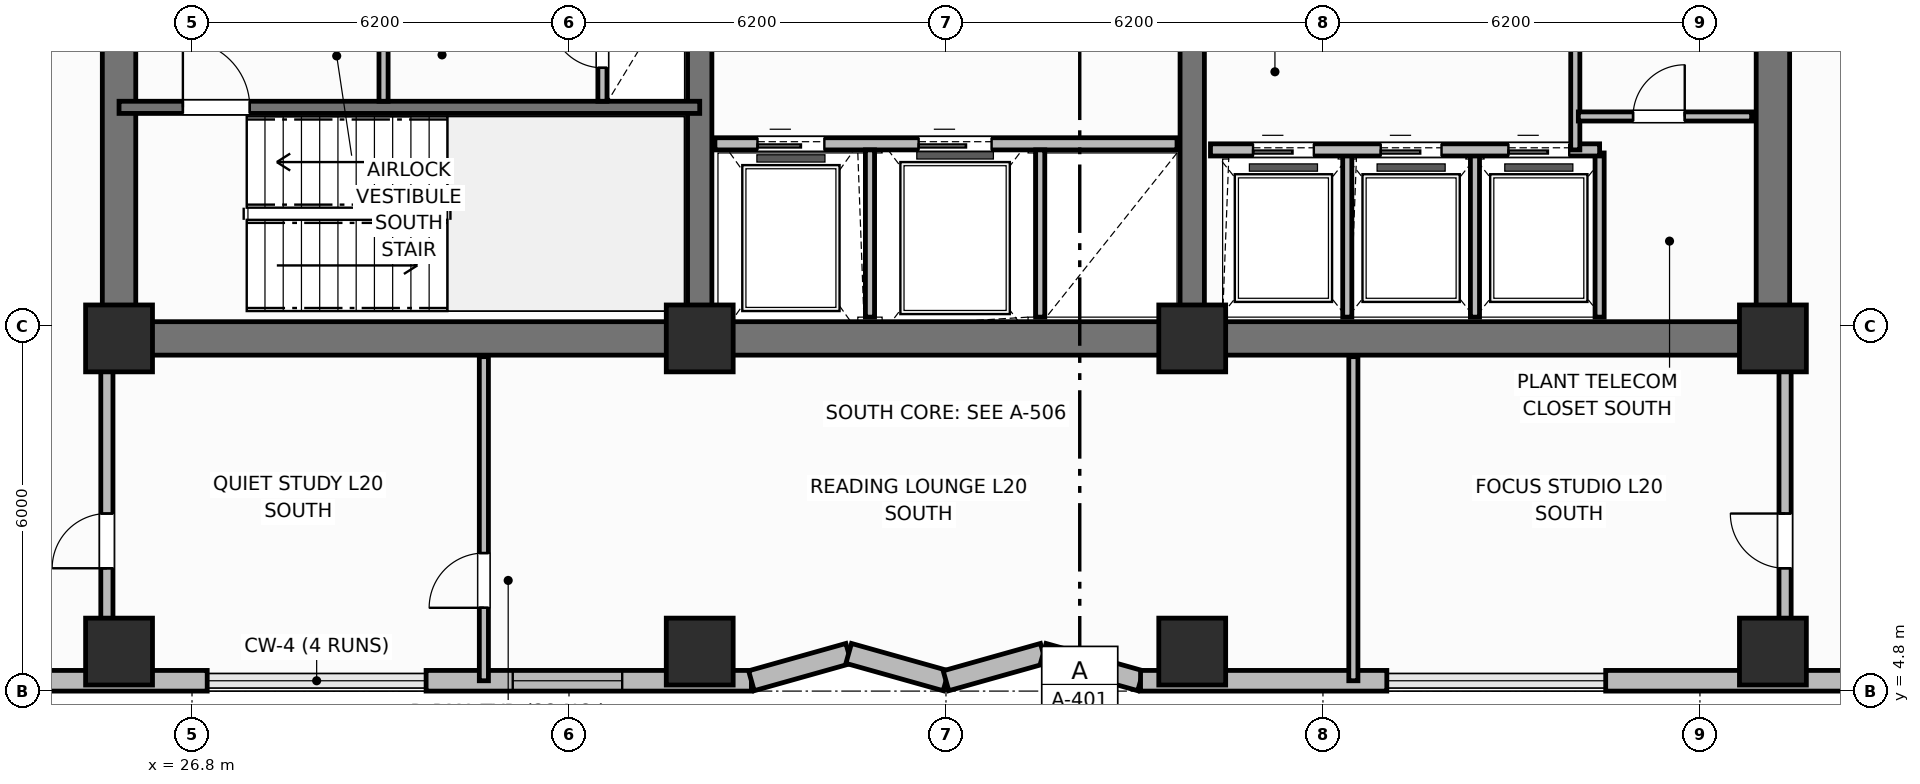
"""IFC4 building model, lengths in metres.
Left out: names, types, materials, properties, quantities, classifications, styles, units other than length and angle.
Written with IfcOpenShell. Run it as: python <this file> out.ifc"""

import sys

from ifc_helpers import new_model, si_unit, direction, frame, frame_2d, origin, origin_2d, place, context, subcontext, project, spatial, rectangle, extrude, element, fill, save


model = new_model("IFC4")
c1 = context("Model", 3, precision=1e-05, world=origin(), true_north=direction((0.0, 1.0)))
c2 = subcontext(c1, "Body", "Model", "MODEL_VIEW")
j1 = project(units=[si_unit("LENGTHUNIT", "METRE"), si_unit("PLANEANGLEUNIT", "RADIAN")], contexts=[c1])
p1 = place(None, origin())
s1 = spatial("IfcSite", under=j1, at=p1, CompositionType="ELEMENT")
p2 = place(p1, origin())
s2 = spatial("IfcBuilding", under=s1, at=p2, CompositionType="ELEMENT")
p3 = place(p2, frame((0.0, 0.0, 84.1)))
s3 = spatial("IfcBuildingStorey", under=s2, at=p3, CompositionType="ELEMENT", Elevation=84.1)
p4 = place(p3, frame((52.8, 10.6, 0.0), z_axis=(0.0, 0.0, 1.0), x_axis=(-1.0, 0.0, 0.0)))
e1 = element("IfcWall", 1, at=p4, inside=s3, PredefinedType="SHEAR", context=c2, shape_type="SweptSolid", body=[
    extrude(rectangle(XDim=27.2, YDim=0.55, at=frame_2d((13.6, 0.0))), origin(), (0.0, 0.0, 1.0), 4.2),
])
for number, where, z_axis, x_axis in (
    (2, (25.6, 10.875, 0.0), (0.0, 0.0, 1.0), (0.0, 1.0, 0.0)),
    (3, (52.8, 10.875, 0.0), (0.0, 0.0, 1.0), (0.0, 1.0, 0.0)),
):
    element("IfcWall", number, at=place(p3, frame(where, z_axis=z_axis, x_axis=x_axis)), inside=s3, PredefinedType="SHEAR", context=c2, shape_type="SweptSolid", body=[
        extrude(rectangle(XDim=5.65, YDim=0.55, at=frame_2d((2.825, 0.0))), origin(), (0.0, 0.0, 1.0), 4.2),
    ])
for number, where, z_axis, x_axis in (
    (4, (35.15, 10.875, 0.0), (0.0, 0.0, 1.0), (0.0, 1.0, 0.0)),
    (5, (43.25, 10.875, 0.0), (0.0, 0.0, 1.0), (0.0, 1.0, 0.0)),
):
    element("IfcWall", number, at=place(p3, frame(where, z_axis=z_axis, x_axis=x_axis)), inside=s3, PredefinedType="SHEAR", context=c2, shape_type="SweptSolid", body=[
        extrude(rectangle(XDim=5.65, YDim=0.4, at=frame_2d((2.825, 0.0))), origin(), (0.0, 0.0, 1.0), 4.2),
    ])
for number, where, z_axis, x_axis in (
    (6, (25.6, 10.6, 0.0), (0.0, 0.0, 1.0), (1.0, 0.0, 0.0)),
    (7, (35.15, 10.6, 0.0), (0.0, 0.0, 1.0), (1.0, 0.0, 0.0)),
    (8, (43.25, 10.6, 0.0), (0.0, 0.0, 1.0), (1.0, 0.0, 0.0)),
    (9, (52.8, 10.6, 0.0), (0.0, 0.0, 1.0), (1.0, 0.0, 0.0)),
    (10, (25.6, 5.45, 0.0), (0.0, 0.0, 1.0), (1.0, 0.0, 0.0)),
    (11, (35.15, 5.45, 0.0), (0.0, 0.0, 1.0), (1.0, 0.0, 0.0)),
    (12, (43.25, 5.45, 0.0), (0.0, 0.0, 1.0), (1.0, 0.0, 0.0)),
    (13, (52.8, 5.45, 0.0), (0.0, 0.0, 1.0), (1.0, 0.0, 0.0)),
):
    element("IfcColumn", number, at=place(p3, frame(where, z_axis=z_axis, x_axis=x_axis)), inside=s3, PredefinedType="COLUMN", context=c2, shape_type="SweptSolid", body=[
        extrude(rectangle(XDim=1.1, YDim=1.1, at=origin_2d()), origin(), (0.0, 0.0, 1.0), 4.2),
    ])
p5 = place(p3, frame((18.6, 4.97, 0.0), z_axis=(0.0, 0.0, 1.0), x_axis=(1.0, 0.0, 0.0)))
e14 = element("IfcWall", 14, at=p5, inside=s3, PredefinedType="SOLIDWALL", context=c2, shape_type="SweptSolid", body=[
    extrude(rectangle(XDim=8.45, YDim=0.34, at=frame_2d((4.225, 0.0))), origin(), (0.0, 0.0, 1.0), 3.2),
])
p6 = place(p5, frame((1.538, 0.0, 0.85)))
e15 = element("IfcOpeningElement", 15, at=p6, cuts=e14, PredefinedType="OPENING", context=c2, shape_type="SweptSolid", body=[
    extrude(rectangle(XDim=1.8, YDim=1.85, at=frame_2d((0.9, 0.925))), frame((0.0, 0.18, 0.0), z_axis=(0.0, -1.0, 0.0), x_axis=(1.0, 0.0, 0.0)), (0.0, 0.0, 1.0), 0.36),
])
p7 = place(p3, frame((30.65, 4.97, 0.0), z_axis=(0.0, 0.0, 1.0), x_axis=(1.0, 0.0, 0.0)))
e16 = element("IfcWall", 16, at=p7, inside=s3, PredefinedType="SOLIDWALL", context=c2, shape_type="SweptSolid", body=[
    extrude(rectangle(XDim=5.35, YDim=0.34, at=frame_2d((2.675, 0.0))), origin(), (0.0, 0.0, 1.0), 3.2),
])
p8 = place(p7, frame((1.425, 0.0, 0.85)))
e17 = element("IfcOpeningElement", 17, at=p8, cuts=e16, PredefinedType="OPENING", context=c2, shape_type="SweptSolid", body=[
    extrude(rectangle(XDim=1.8, YDim=1.85, at=frame_2d((0.9, 0.925))), frame((0.0, 0.18, 0.0), z_axis=(0.0, -1.0, 0.0), x_axis=(1.0, 0.0, 0.0)), (0.0, 0.0, 1.0), 0.36),
])
p9 = place(p3, frame((36.0, 4.97, 0.0), z_axis=(0.0, 0.0, 1.0), x_axis=(0.962662902433, 0.270703040766, 0.0)))
e18 = element("IfcWall", 18, at=p9, inside=s3, PredefinedType="SOLIDWALL", context=c2, shape_type="SweptSolid", body=[
    extrude(rectangle(XDim=1.662, YDim=0.34, at=frame_2d((0.831, 0.0))), origin(), (0.0, 0.0, 1.0), 3.2),
])
p10 = place(p3, frame((37.6, 5.42, 0.0), z_axis=(0.0, 0.0, 1.0), x_axis=(0.962652136636, -0.270741322725, 0.0)))
e19 = element("IfcWall", 19, at=p10, inside=s3, PredefinedType="SOLIDWALL", context=c2, shape_type="SweptSolid", body=[
    extrude(rectangle(XDim=1.662, YDim=0.34, at=frame_2d((0.831, 0.0))), origin(), (0.0, 0.0, 1.0), 3.2),
])
p11 = place(p3, frame((39.2, 4.97, 0.0), z_axis=(0.0, 0.0, 1.0), x_axis=(0.962662902433, 0.270703040766, 0.0)))
e20 = element("IfcWall", 20, at=p11, inside=s3, PredefinedType="SOLIDWALL", context=c2, shape_type="SweptSolid", body=[
    extrude(rectangle(XDim=1.662, YDim=0.34, at=frame_2d((0.831, 0.0))), origin(), (0.0, 0.0, 1.0), 3.2),
])
p12 = place(p3, frame((40.8, 5.42, 0.0), z_axis=(0.0, 0.0, 1.0), x_axis=(0.962652136636, -0.270741322725, 0.0)))
e21 = element("IfcWall", 21, at=p12, inside=s3, PredefinedType="SOLIDWALL", context=c2, shape_type="SweptSolid", body=[
    extrude(rectangle(XDim=1.662, YDim=0.34, at=frame_2d((0.831, 0.0))), origin(), (0.0, 0.0, 1.0), 3.2),
])
p13 = place(p3, frame((42.4, 4.97, 0.0), z_axis=(0.0, 0.0, 1.0), x_axis=(1.0, 0.0, 0.0)))
e22 = element("IfcWall", 22, at=p13, inside=s3, PredefinedType="SOLIDWALL", context=c2, shape_type="SweptSolid", body=[
    extrude(rectangle(XDim=4.05, YDim=0.34, at=frame_2d((2.025, 0.0))), origin(), (0.0, 0.0, 1.0), 3.2),
])
p14 = place(p3, frame((50.05, 4.97, 0.0), z_axis=(0.0, 0.0, 1.0), x_axis=(1.0, 0.0, 0.0)))
e23 = element("IfcWall", 23, at=p14, inside=s3, PredefinedType="SOLIDWALL", context=c2, shape_type="SweptSolid", body=[
    extrude(rectangle(XDim=9.75, YDim=0.34, at=frame_2d((4.875, 0.0))), origin(), (0.0, 0.0, 1.0), 3.2),
])
p15 = place(p14, frame((6.087, 0.0, 0.85)))
e24 = element("IfcOpeningElement", 24, at=p15, cuts=e23, PredefinedType="OPENING", context=c2, shape_type="SweptSolid", body=[
    extrude(rectangle(XDim=1.8, YDim=1.85, at=frame_2d((0.9, 0.925))), frame((0.0, 0.18, 0.0), z_axis=(0.0, -1.0, 0.0), x_axis=(1.0, 0.0, 0.0)), (0.0, 0.0, 1.0), 0.36),
])
p16 = place(p3, frame((25.6, 14.4, 0.0), z_axis=(0.0, 0.0, 1.0), x_axis=(1.0, 0.0, 0.0)))
e25 = element("IfcWall", 25, at=p16, inside=s3, PredefinedType="SHEAR", context=c2, shape_type="SweptSolid", body=[
    extrude(rectangle(XDim=9.55, YDim=0.2, at=frame_2d((4.775, 0.0))), origin(), (0.0, 0.0, 1.0), 4.2),
])
p17 = place(p16, frame((1.05, 0.0, 0.0)))
e26 = element("IfcOpeningElement", 26, at=p17, cuts=e25, PredefinedType="OPENING", context=c2, shape_type="SweptSolid", body=[
    extrude(rectangle(XDim=1.1, YDim=2.15, at=frame_2d((0.55, 1.075))), frame((0.0, 0.11, 0.0), z_axis=(0.0, -1.0, 0.0), x_axis=(1.0, 0.0, 0.0)), (0.0, 0.0, 1.0), 0.22),
])
p18 = place(p3, frame((29.95, 14.5, 0.0), z_axis=(0.0, 0.0, 1.0), x_axis=(0.0, 1.0, 0.0)))
e27 = element("IfcWall", 27, at=p18, inside=s3, PredefinedType="PARTITIONING", context=c2, shape_type="SweptSolid", body=[
    extrude(rectangle(XDim=2.08, YDim=0.15, at=frame_2d((1.04, 0.0))), origin(), (0.0, 0.0, 1.0), 3.03),
])
p19 = place(p3, frame((33.55, 14.5, 0.0), z_axis=(0.0, 0.0, 1.0), x_axis=(0.0, 1.0, 0.0)))
e28 = element("IfcWall", 28, at=p19, inside=s3, PredefinedType="PARTITIONING", context=c2, shape_type="SweptSolid", body=[
    extrude(rectangle(XDim=2.08, YDim=0.15, at=frame_2d((1.04, 0.0))), origin(), (0.0, 0.0, 1.0), 3.03),
])
p20 = place(p19, frame((0.55, 0.0, 0.0)))
e29 = element("IfcOpeningElement", 29, at=p20, cuts=e28, PredefinedType="OPENING", context=c2, shape_type="SweptSolid", body=[
    extrude(rectangle(XDim=0.85, YDim=2.05, at=frame_2d((0.425, 1.025))), frame((0.0, 0.085, 0.0), z_axis=(0.0, -1.0, 0.0), x_axis=(1.0, 0.0, 0.0)), (0.0, 0.0, 1.0), 0.17),
])
p21 = place(p3, frame((35.4, 13.8, 0.0), z_axis=(0.0, 0.0, 1.0), x_axis=(1.0, 0.0, 0.0)))
e30 = element("IfcWall", 30, at=p21, inside=s3, PredefinedType="PARTITIONING", context=c2, shape_type="SweptSolid", body=[
    extrude(rectangle(XDim=7.6, YDim=0.2, at=frame_2d((3.8, 0.0))), origin(), (0.0, 0.0, 1.0), 2.8),
])
p22 = place(p21, frame((0.7, 0.0, 0.0)))
e31 = element("IfcOpeningElement", 31, at=p22, cuts=e30, PredefinedType="OPENING", context=c2, shape_type="SweptSolid", body=[
    extrude(rectangle(XDim=1.1, YDim=2.15, at=frame_2d((0.55, 1.075))), frame((0.0, 0.11, 0.0), z_axis=(0.0, -1.0, 0.0), x_axis=(1.0, 0.0, 0.0)), (0.0, 0.0, 1.0), 0.22),
])
p23 = place(p21, frame((3.35, 0.0, 0.0)))
e32 = element("IfcOpeningElement", 32, at=p23, cuts=e30, PredefinedType="OPENING", context=c2, shape_type="SweptSolid", body=[
    extrude(rectangle(XDim=1.2, YDim=2.15, at=frame_2d((0.6, 1.075))), frame((0.0, 0.11, 0.0), z_axis=(0.0, -1.0, 0.0), x_axis=(1.0, 0.0, 0.0)), (0.0, 0.0, 1.0), 0.22),
])
for number, where, z_axis, x_axis in (
    (33, (37.95, 10.95, 0.0), (0.0, 0.0, 1.0), (0.0, 1.0, 0.0)),
    (34, (40.75, 10.95, 0.0), (0.0, 0.0, 1.0), (0.0, 1.0, 0.0)),
):
    element("IfcWall", number, at=place(p3, frame(where, z_axis=z_axis, x_axis=x_axis)), inside=s3, PredefinedType="PARTITIONING", context=c2, shape_type="SweptSolid", body=[
        extrude(rectangle(XDim=2.75, YDim=0.15, at=frame_2d((1.375, 0.0))), origin(), (0.0, 0.0, 1.0), 3.03),
    ])
for number, where, z_axis, x_axis in (
    (35, (45.8, 10.95, 0.0), (0.0, 0.0, 1.0), (0.0, 1.0, 0.0)),
    (36, (47.9, 10.95, 0.0), (0.0, 0.0, 1.0), (0.0, 1.0, 0.0)),
    (37, (49.95, 10.95, 0.0), (0.0, 0.0, 1.0), (0.0, 1.0, 0.0)),
):
    element("IfcWall", number, at=place(p3, frame(where, z_axis=z_axis, x_axis=x_axis)), inside=s3, PredefinedType="PARTITIONING", context=c2, shape_type="SweptSolid", body=[
        extrude(rectangle(XDim=2.7, YDim=0.15, at=frame_2d((1.35, 0.0))), origin(), (0.0, 0.0, 1.0), 3.03),
    ])
p24 = place(p3, frame((43.55, 13.7, 0.0), z_axis=(0.0, 0.0, 1.0), x_axis=(1.0, 0.0, 0.0)))
e38 = element("IfcWall", 38, at=p24, inside=s3, PredefinedType="PARTITIONING", context=c2, shape_type="SweptSolid", body=[
    extrude(rectangle(XDim=6.4, YDim=0.2, at=frame_2d((3.2, 0.0))), origin(), (0.0, 0.0, 1.0), 3.03),
])
p25 = place(p24, frame((0.7, 0.0, 0.0)))
e39 = element("IfcOpeningElement", 39, at=p25, cuts=e38, PredefinedType="OPENING", context=c2, shape_type="SweptSolid", body=[
    extrude(rectangle(XDim=1.0, YDim=2.15, at=frame_2d((0.5, 1.075))), frame((0.0, 0.11, 0.0), z_axis=(0.0, -1.0, 0.0), x_axis=(1.0, 0.0, 0.0)), (0.0, 0.0, 1.0), 0.22),
])
p26 = place(p24, frame((2.8, 0.0, 0.0)))
e40 = element("IfcOpeningElement", 40, at=p26, cuts=e38, PredefinedType="OPENING", context=c2, shape_type="SweptSolid", body=[
    extrude(rectangle(XDim=1.0, YDim=2.15, at=frame_2d((0.5, 1.075))), frame((0.0, 0.11, 0.0), z_axis=(0.0, -1.0, 0.0), x_axis=(1.0, 0.0, 0.0)), (0.0, 0.0, 1.0), 0.22),
])
p27 = place(p24, frame((4.9, 0.0, 0.0)))
e41 = element("IfcOpeningElement", 41, at=p27, cuts=e38, PredefinedType="OPENING", context=c2, shape_type="SweptSolid", body=[
    extrude(rectangle(XDim=1.0, YDim=2.15, at=frame_2d((0.5, 1.075))), frame((0.0, 0.11, 0.0), z_axis=(0.0, -1.0, 0.0), x_axis=(1.0, 0.0, 0.0)), (0.0, 0.0, 1.0), 0.22),
])
p28 = place(p3, frame((49.55, 13.7, 0.0), z_axis=(0.0, 0.0, 1.0), x_axis=(0.0, 1.0, 0.0)))
e42 = element("IfcWall", 42, at=p28, inside=s3, PredefinedType="PARTITIONING", context=c2, shape_type="SweptSolid", body=[
    extrude(rectangle(XDim=2.88, YDim=0.15, at=frame_2d((1.44, 0.0))), origin(), (0.0, 0.0, 1.0), 3.03),
])
p29 = place(p3, frame((49.6, 14.25, 0.0), z_axis=(0.0, 0.0, 1.0), x_axis=(1.0, 0.0, 0.0)))
e43 = element("IfcWall", 43, at=p29, inside=s3, PredefinedType="PARTITIONING", context=c2, shape_type="SweptSolid", body=[
    extrude(rectangle(XDim=2.85, YDim=0.15, at=frame_2d((1.425, 0.0))), origin(), (0.0, 0.0, 1.0), 3.03),
])
p30 = place(p29, frame((0.9, 0.0, 0.0)))
e44 = element("IfcOpeningElement", 44, at=p30, cuts=e43, PredefinedType="OPENING", context=c2, shape_type="SweptSolid", body=[
    extrude(rectangle(XDim=0.85, YDim=2.1, at=frame_2d((0.425, 1.05))), frame((0.0, 0.085, 0.0), z_axis=(0.0, -1.0, 0.0), x_axis=(1.0, 0.0, 0.0)), (0.0, 0.0, 1.0), 0.17),
])
p31 = place(p3, frame((31.6, 4.97, 0.0), z_axis=(0.0, 0.0, 1.0), x_axis=(0.0, 1.0, 0.0)))
e45 = element("IfcWall", 45, at=p31, inside=s3, PredefinedType="PARTITIONING", context=c2, shape_type="SweptSolid", body=[
    extrude(rectangle(XDim=5.33, YDim=0.15, at=frame_2d((2.665, 0.0))), origin(), (0.0, 0.0, 1.0), 3.03),
])
p32 = place(p31, frame((1.2, 0.0, 0.0)))
e46 = element("IfcOpeningElement", 46, at=p32, cuts=e45, PredefinedType="OPENING", context=c2, shape_type="SweptSolid", body=[
    extrude(rectangle(XDim=0.9, YDim=2.1, at=frame_2d((0.45, 1.05))), frame((0.0, 0.085, 0.0), z_axis=(0.0, -1.0, 0.0), x_axis=(1.0, 0.0, 0.0)), (0.0, 0.0, 1.0), 0.17),
])
p33 = place(p3, frame((45.9, 4.97, 0.0), z_axis=(0.0, 0.0, 1.0), x_axis=(0.0, 1.0, 0.0)))
e47 = element("IfcWall", 47, at=p33, inside=s3, PredefinedType="PARTITIONING", context=c2, shape_type="SweptSolid", body=[
    extrude(rectangle(XDim=5.33, YDim=0.15, at=frame_2d((2.665, 0.0))), origin(), (0.0, 0.0, 1.0), 3.03),
])
p34 = place(p3, frame((25.4, 5.52, 0.0), z_axis=(0.0, 0.0, 1.0), x_axis=(0.0, 1.0, 0.0)))
e48 = element("IfcWall", 48, at=p34, inside=s3, PredefinedType="PARTITIONING", context=c2, shape_type="SweptSolid", body=[
    extrude(rectangle(XDim=4.78, YDim=0.2, at=frame_2d((2.39, 0.0))), origin(), (0.0, 0.0, 1.0), 3.03),
])
p35 = place(p34, frame((1.3, 0.0, 0.0)))
e49 = element("IfcOpeningElement", 49, at=p35, cuts=e48, PredefinedType="OPENING", context=c2, shape_type="SweptSolid", body=[
    extrude(rectangle(XDim=0.9, YDim=2.1, at=frame_2d((0.45, 1.05))), frame((0.0, 0.11, 0.0), z_axis=(0.0, -1.0, 0.0), x_axis=(1.0, 0.0, 0.0)), (0.0, 0.0, 1.0), 0.22),
])
p36 = place(p3, frame((53.0, 5.52, 0.0), z_axis=(0.0, 0.0, 1.0), x_axis=(0.0, 1.0, 0.0)))
e50 = element("IfcWall", 50, at=p36, inside=s3, PredefinedType="PARTITIONING", context=c2, shape_type="SweptSolid", body=[
    extrude(rectangle(XDim=4.78, YDim=0.2, at=frame_2d((2.39, 0.0))), origin(), (0.0, 0.0, 1.0), 3.03),
])
p37 = place(p36, frame((1.3, 0.0, 0.0)))
e51 = element("IfcOpeningElement", 51, at=p37, cuts=e50, PredefinedType="OPENING", context=c2, shape_type="SweptSolid", body=[
    extrude(rectangle(XDim=0.9, YDim=2.1, at=frame_2d((0.45, 1.05))), frame((0.0, 0.11, 0.0), z_axis=(0.0, -1.0, 0.0), x_axis=(1.0, 0.0, 0.0)), (0.0, 0.0, 1.0), 0.22),
])
p38 = place(p8, origin())
e52 = element("IfcWindow", 52, at=p38, inside=s3, PartitioningType="SINGLE_PANEL", PredefinedType="WINDOW", context=c2, shape_type="SweptSolid", body=[
    extrude(rectangle(XDim=1.8, YDim=1.85, at=frame_2d((0.9, 0.925))), frame((0.0, 0.03, 0.0), z_axis=(0.0, -1.0, 0.0), x_axis=(1.0, 0.0, 0.0)), (0.0, 0.0, 1.0), 0.06),
])
fill(e17, e52)
p39 = place(p17, origin())
e53 = element("IfcDoor", 53, at=p39, inside=s3, OperationType="SINGLE_SWING_LEFT", PredefinedType="DOOR", context=c2, shape_type="SweptSolid", body=[
    extrude(rectangle(XDim=1.1, YDim=2.15, at=frame_2d((0.55, 1.075))), frame((0.0, 0.025, 0.0), z_axis=(0.0, -1.0, 0.0), x_axis=(1.0, 0.0, 0.0)), (0.0, 0.0, 1.0), 0.05),
])
fill(e26, e53)
p40 = place(p20, origin())
e54 = element("IfcDoor", 54, at=p40, inside=s3, OperationType="SINGLE_SWING_RIGHT", PredefinedType="TRAPDOOR", context=c2, shape_type="SweptSolid", body=[
    extrude(rectangle(XDim=0.85, YDim=2.05, at=frame_2d((0.425, 1.025))), frame((0.0, 0.025, 0.0), z_axis=(0.0, -1.0, 0.0), x_axis=(1.0, 0.0, 0.0)), (0.0, 0.0, 1.0), 0.05),
])
fill(e29, e54)
p41 = place(p22, origin())
e55 = element("IfcDoor", 55, at=p41, inside=s3, OperationType="SLIDING_TO_LEFT", PredefinedType="DOOR", context=c2, shape_type="SweptSolid", body=[
    extrude(rectangle(XDim=1.1, YDim=2.15, at=frame_2d((0.55, 1.075))), frame((0.0, 0.025, 0.0), z_axis=(0.0, -1.0, 0.0), x_axis=(1.0, 0.0, 0.0)), (0.0, 0.0, 1.0), 0.05),
])
fill(e31, e55)
p42 = place(p23, origin())
e56 = element("IfcDoor", 56, at=p42, inside=s3, OperationType="SLIDING_TO_LEFT", PredefinedType="DOOR", context=c2, shape_type="SweptSolid", body=[
    extrude(rectangle(XDim=1.2, YDim=2.15, at=frame_2d((0.6, 1.075))), frame((0.0, 0.025, 0.0), z_axis=(0.0, -1.0, 0.0), x_axis=(1.0, 0.0, 0.0)), (0.0, 0.0, 1.0), 0.05),
])
fill(e32, e56)
p43 = place(p25, origin())
e57 = element("IfcDoor", 57, at=p43, inside=s3, OperationType="SLIDING_TO_LEFT", PredefinedType="DOOR", context=c2, shape_type="SweptSolid", body=[
    extrude(rectangle(XDim=1.0, YDim=2.15, at=frame_2d((0.5, 1.075))), frame((0.0, 0.025, 0.0), z_axis=(0.0, -1.0, 0.0), x_axis=(1.0, 0.0, 0.0)), (0.0, 0.0, 1.0), 0.05),
])
fill(e39, e57)
p44 = place(p26, origin())
e58 = element("IfcDoor", 58, at=p44, inside=s3, OperationType="SLIDING_TO_LEFT", PredefinedType="DOOR", context=c2, shape_type="SweptSolid", body=[
    extrude(rectangle(XDim=1.0, YDim=2.15, at=frame_2d((0.5, 1.075))), frame((0.0, 0.025, 0.0), z_axis=(0.0, -1.0, 0.0), x_axis=(1.0, 0.0, 0.0)), (0.0, 0.0, 1.0), 0.05),
])
fill(e40, e58)
p45 = place(p27, origin())
e59 = element("IfcDoor", 59, at=p45, inside=s3, OperationType="SLIDING_TO_LEFT", PredefinedType="DOOR", context=c2, shape_type="SweptSolid", body=[
    extrude(rectangle(XDim=1.0, YDim=2.15, at=frame_2d((0.5, 1.075))), frame((0.0, 0.025, 0.0), z_axis=(0.0, -1.0, 0.0), x_axis=(1.0, 0.0, 0.0)), (0.0, 0.0, 1.0), 0.05),
])
fill(e41, e59)
p46 = place(p30, origin())
e60 = element("IfcDoor", 60, at=p46, inside=s3, OperationType="SINGLE_SWING_RIGHT", PredefinedType="DOOR", context=c2, shape_type="SweptSolid", body=[
    extrude(rectangle(XDim=0.85, YDim=2.1, at=frame_2d((0.425, 1.05))), frame((0.0, 0.025, 0.0), z_axis=(0.0, -1.0, 0.0), x_axis=(1.0, 0.0, 0.0)), (0.0, 0.0, 1.0), 0.05),
])
fill(e44, e60)
p47 = place(p32, origin())
e61 = element("IfcDoor", 61, at=p47, inside=s3, OperationType="SINGLE_SWING_LEFT", PredefinedType="DOOR", context=c2, shape_type="SweptSolid", body=[
    extrude(rectangle(XDim=0.9, YDim=2.1, at=frame_2d((0.45, 1.05))), frame((0.0, 0.025, 0.0), z_axis=(0.0, -1.0, 0.0), x_axis=(1.0, 0.0, 0.0)), (0.0, 0.0, 1.0), 0.05),
])
fill(e46, e61)
p48 = place(p35, origin())
e62 = element("IfcDoor", 62, at=p48, inside=s3, OperationType="SINGLE_SWING_LEFT", PredefinedType="DOOR", context=c2, shape_type="SweptSolid", body=[
    extrude(rectangle(XDim=0.9, YDim=2.1, at=frame_2d((0.45, 1.05))), frame((0.0, 0.025, 0.0), z_axis=(0.0, -1.0, 0.0), x_axis=(1.0, 0.0, 0.0)), (0.0, 0.0, 1.0), 0.05),
])
fill(e49, e62)
p49 = place(p37, origin())
e63 = element("IfcDoor", 63, at=p49, inside=s3, OperationType="SINGLE_SWING_RIGHT", PredefinedType="DOOR", context=c2, shape_type="SweptSolid", body=[
    extrude(rectangle(XDim=0.9, YDim=2.1, at=frame_2d((0.45, 1.05))), frame((0.0, 0.025, 0.0), z_axis=(0.0, -1.0, 0.0), x_axis=(1.0, 0.0, 0.0)), (0.0, 0.0, 1.0), 0.05),
])
fill(e51, e63)
save(model, sys.argv[1])
